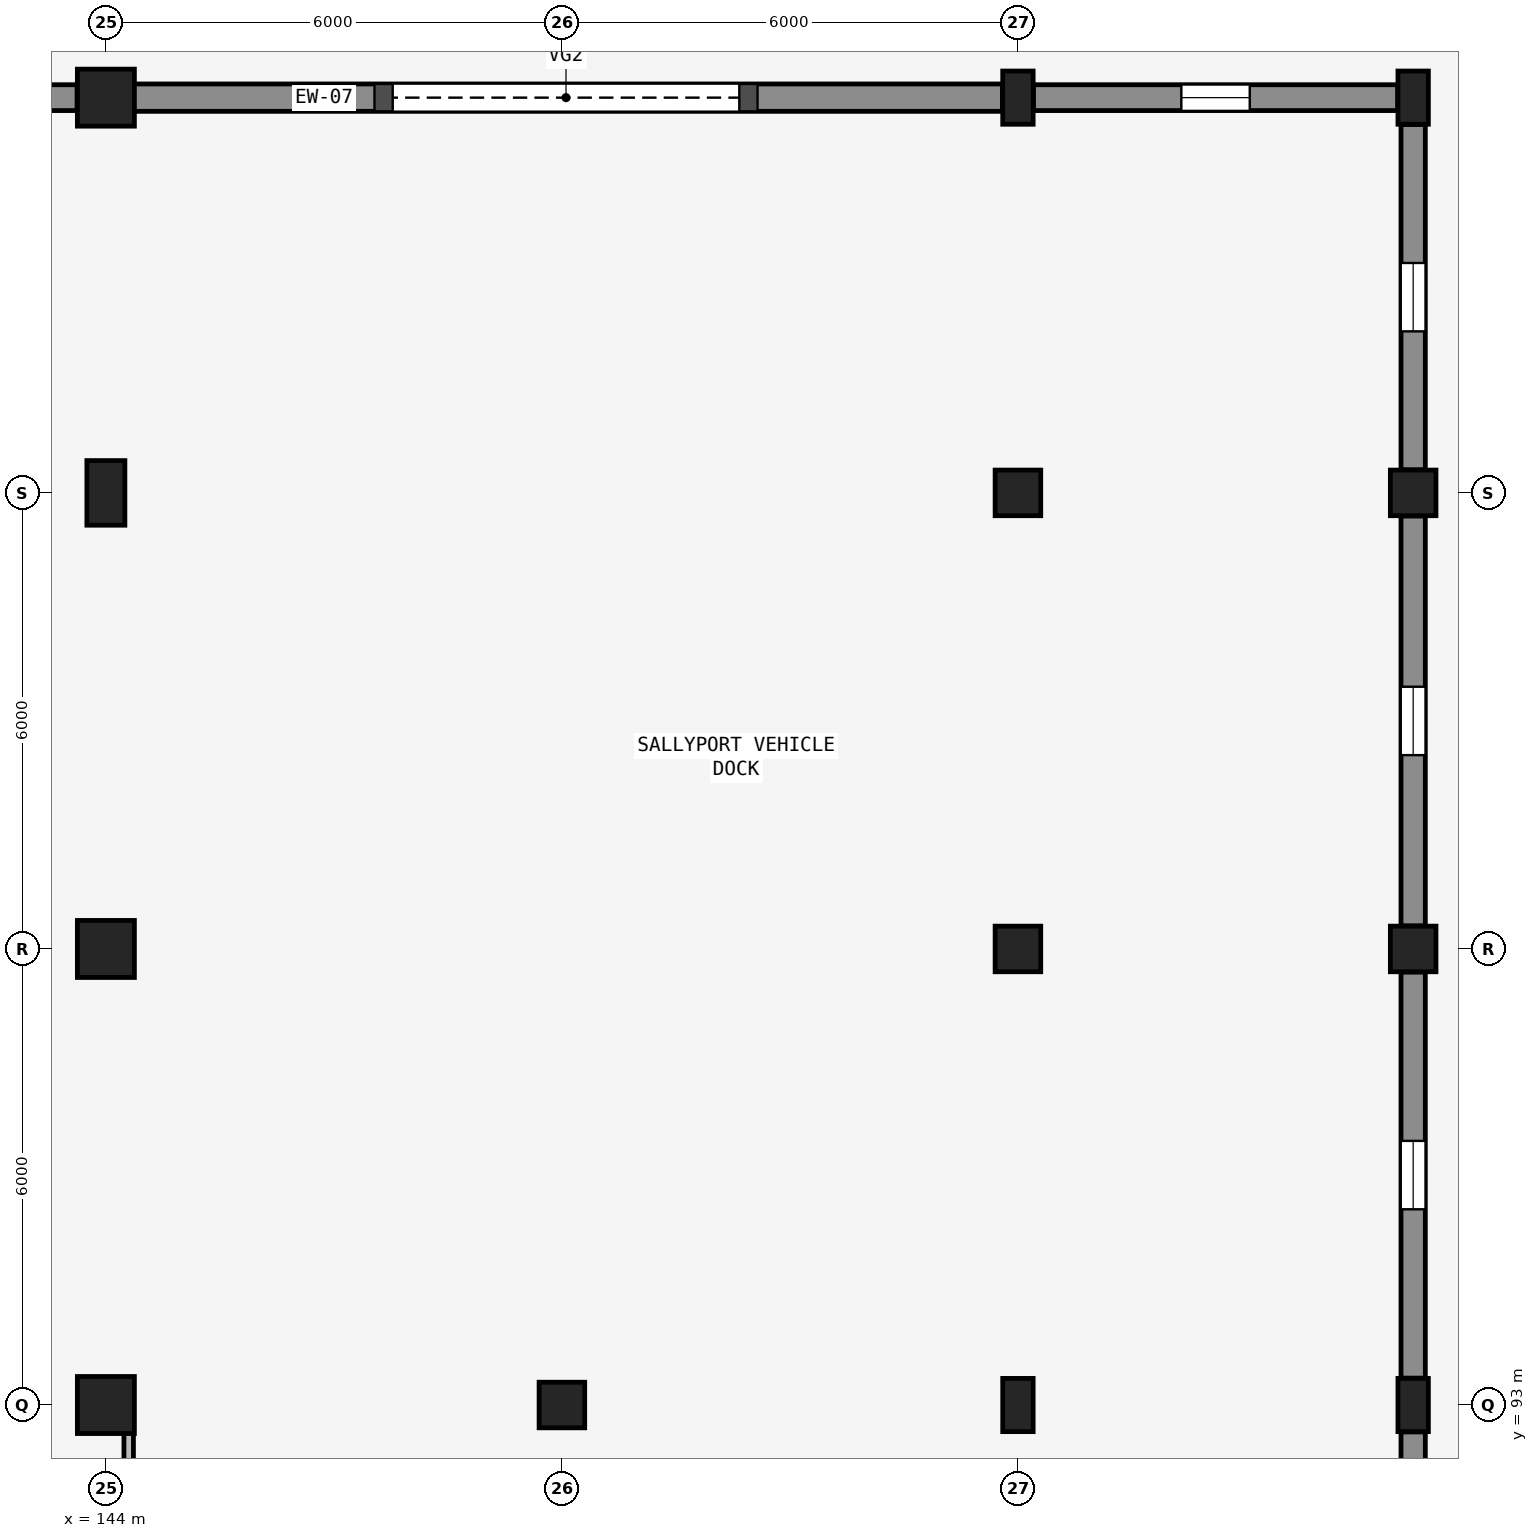
"""IFC4 building model, lengths in metres.
Left out: names, types, materials, properties, quantities, classifications, styles, units other than length and angle.
Written with IfcOpenShell. Run it as: python <this file> out.ifc"""

import sys

from ifc_helpers import new_model, si_unit, direction, frame, frame_2d, origin, origin_2d, place, context, subcontext, project, spatial, rectangle, extrude, element, fill, save


model = new_model("IFC4")
c1 = context("Model", 3, precision=1e-05, world=origin(), true_north=direction((0.0, 1.0)))
c2 = subcontext(c1, "Body", "Model", "MODEL_VIEW")
j1 = project(units=[si_unit("LENGTHUNIT", "METRE"), si_unit("PLANEANGLEUNIT", "RADIAN")], contexts=[c1])
p1 = place(None, origin())
s1 = spatial("IfcSite", under=j1, at=p1, CompositionType="ELEMENT")
p2 = place(p1, origin())
s2 = spatial("IfcBuilding", under=s1, at=p2, CompositionType="ELEMENT")
p3 = place(p2, origin())
s3 = spatial("IfcBuildingStorey", under=s2, at=p3, CompositionType="ELEMENT", Elevation=0.0)
for number, where, z_axis, x_axis in (
    (1, (144.0, 93.0, 0.0), (0.0, 0.0, 1.0), (1.0, 0.0, 0.0)),
    (2, (144.0, 99.0, 0.0), (0.0, 0.0, 1.0), (1.0, 0.0, 0.0)),
):
    element("IfcColumn", number, at=place(p3, frame(where, z_axis=z_axis, x_axis=x_axis)), inside=s3, PredefinedType="COLUMN", context=c2, shape_type="SweptSolid", body=[
        extrude(rectangle(XDim=0.75, YDim=0.75, at=origin_2d()), origin(), (0.0, 0.0, 1.0), 4.8),
    ])
p4 = place(p3, frame((144.0, 105.0, 0.0), z_axis=(0.0, 0.0, 1.0), x_axis=(1.0, 0.0, 0.0)))
e3 = element("IfcColumn", 3, at=p4, inside=s3, PredefinedType="COLUMN", context=c2, shape_type="SweptSolid", body=[
    extrude(rectangle(XDim=0.5, YDim=0.85, at=origin_2d()), origin(), (0.0, 0.0, 1.0), 4.8),
])
p5 = place(p3, frame((144.0, 110.2, 0.0), z_axis=(0.0, 0.0, 1.0), x_axis=(1.0, 0.0, 0.0)))
e4 = element("IfcColumn", 4, at=p5, inside=s3, PredefinedType="COLUMN", context=c2, shape_type="SweptSolid", body=[
    extrude(rectangle(XDim=0.75, YDim=0.75, at=origin_2d()), origin(), (0.0, 0.0, 1.0), 4.8),
])
p6 = place(p3, frame((150.0, 93.0, 0.0), z_axis=(0.0, 0.0, 1.0), x_axis=(1.0, 0.0, 0.0)))
e5 = element("IfcColumn", 5, at=p6, inside=s3, PredefinedType="COLUMN", context=c2, shape_type="SweptSolid", body=[
    extrude(rectangle(XDim=0.6, YDim=0.6, at=origin_2d()), origin(), (0.0, 0.0, 1.0), 4.8),
])
p7 = place(p3, frame((156.0, 93.0, 0.0), z_axis=(0.0, 0.0, 1.0), x_axis=(1.0, 0.0, 0.0)))
e6 = element("IfcColumn", 6, at=p7, inside=s3, PredefinedType="COLUMN", context=c2, shape_type="SweptSolid", body=[
    extrude(rectangle(XDim=0.4, YDim=0.7, at=origin_2d()), origin(), (0.0, 0.0, 1.0), 4.8),
])
for number, where, z_axis, x_axis in (
    (7, (156.0, 99.0, 0.0), (0.0, 0.0, 1.0), (1.0, 0.0, 0.0)),
    (8, (156.0, 105.0, 0.0), (0.0, 0.0, 1.0), (1.0, 0.0, 0.0)),
):
    element("IfcColumn", number, at=place(p3, frame(where, z_axis=z_axis, x_axis=x_axis)), inside=s3, PredefinedType="COLUMN", context=c2, shape_type="SweptSolid", body=[
        extrude(rectangle(XDim=0.6, YDim=0.6, at=origin_2d()), origin(), (0.0, 0.0, 1.0), 4.8),
    ])
for number, where, z_axis, x_axis in (
    (9, (156.0, 110.2, 0.0), (0.0, 0.0, 1.0), (1.0, 0.0, 0.0)),
    (10, (161.2, 93.0, 0.0), (0.0, 0.0, 1.0), (1.0, 0.0, 0.0)),
):
    element("IfcColumn", number, at=place(p3, frame(where, z_axis=z_axis, x_axis=x_axis)), inside=s3, PredefinedType="COLUMN", context=c2, shape_type="SweptSolid", body=[
        extrude(rectangle(XDim=0.4, YDim=0.7, at=origin_2d()), origin(), (0.0, 0.0, 1.0), 4.8),
    ])
for number, where, z_axis, x_axis in (
    (11, (161.2, 99.0, 0.0), (0.0, 0.0, 1.0), (1.0, 0.0, 0.0)),
    (12, (161.2, 105.0, 0.0), (0.0, 0.0, 1.0), (1.0, 0.0, 0.0)),
):
    element("IfcColumn", number, at=place(p3, frame(where, z_axis=z_axis, x_axis=x_axis)), inside=s3, PredefinedType="COLUMN", context=c2, shape_type="SweptSolid", body=[
        extrude(rectangle(XDim=0.6, YDim=0.6, at=origin_2d()), origin(), (0.0, 0.0, 1.0), 4.8),
    ])
p8 = place(p3, frame((161.2, 110.2, 0.0), z_axis=(0.0, 0.0, 1.0), x_axis=(1.0, 0.0, 0.0)))
e13 = element("IfcColumn", 13, at=p8, inside=s3, PredefinedType="COLUMN", context=c2, shape_type="SweptSolid", body=[
    extrude(rectangle(XDim=0.4, YDim=0.7, at=origin_2d()), origin(), (0.0, 0.0, 1.0), 4.8),
])
p9 = place(p3, frame((138.254, 110.2, 0.0), z_axis=(0.0, 0.0, 1.0), x_axis=(1.0, 0.0, 0.0)))
e14 = element("IfcWall", 14, at=p9, inside=s3, PredefinedType="SOLIDWALL", context=c2, shape_type="SweptSolid", body=[
    extrude(rectangle(XDim=5.367, YDim=0.34, at=frame_2d((2.684, 0.0))), origin(), (0.0, 0.0, 1.0), 4.083),
])
p10 = place(p9, frame((2.233, 0.0, 1.6)))
e15 = element("IfcOpeningElement", 15, at=p10, cuts=e14, PredefinedType="OPENING", context=c2, shape_type="SweptSolid", body=[
    extrude(rectangle(XDim=0.9, YDim=0.6, at=frame_2d((0.45, 0.3))), frame((0.0, 0.18, 0.0), z_axis=(0.0, -1.0, 0.0), x_axis=(1.0, 0.0, 0.0)), (0.0, 0.0, 1.0), 0.36),
])
p11 = place(p3, frame((144.354, 110.2, 0.0), z_axis=(0.0, 0.0, 1.0), x_axis=(1.0, 0.0, 0.0)))
e16 = element("IfcWall", 16, at=p11, inside=s3, PredefinedType="SOLIDWALL", context=c2, shape_type="SweptSolid", body=[
    extrude(rectangle(XDim=11.442, YDim=0.36, at=frame_2d((5.721, 0.0))), origin(), (0.0, 0.0, 1.0), 3.69),
])
p12 = place(p11, frame((3.3, 0.0, 0.0)))
e17 = element("IfcOpeningElement", 17, at=p12, cuts=e16, PredefinedType="OPENING", context=c2, shape_type="SweptSolid", body=[
    extrude(rectangle(XDim=4.8, YDim=3.1, at=frame_2d((2.4, 1.55))), frame((0.0, 0.19, 0.0), z_axis=(0.0, -1.0, 0.0), x_axis=(1.0, 0.0, 0.0)), (0.0, 0.0, 1.0), 0.38),
])
p13 = place(p3, frame((156.204, 110.2, 0.0), z_axis=(0.0, 0.0, 1.0), x_axis=(1.0, 0.0, 0.0)))
e18 = element("IfcWall", 18, at=p13, inside=s3, PredefinedType="SOLIDWALL", context=c2, shape_type="SweptSolid", body=[
    extrude(rectangle(XDim=4.792, YDim=0.34, at=frame_2d((2.396, 0.0))), origin(), (0.0, 0.0, 1.0), 3.69),
])
p14 = place(p13, frame((1.946, 0.0, 1.6)))
e19 = element("IfcOpeningElement", 19, at=p14, cuts=e18, PredefinedType="OPENING", context=c2, shape_type="SweptSolid", body=[
    extrude(rectangle(XDim=0.9, YDim=0.6, at=frame_2d((0.45, 0.3))), frame((0.0, 0.18, 0.0), z_axis=(0.0, -1.0, 0.0), x_axis=(1.0, 0.0, 0.0)), (0.0, 0.0, 1.0), 0.36),
])
p15 = place(p3, frame((161.2, 87.304, 0.0), z_axis=(0.0, 0.0, 1.0), x_axis=(0.0, 1.0, 0.0)))
e20 = element("IfcWall", 20, at=p15, inside=s3, PredefinedType="SOLIDWALL", context=c2, shape_type="SweptSolid", body=[
    extrude(rectangle(XDim=5.342, YDim=0.32, at=frame_2d((2.671, 0.0))), origin(), (0.0, 0.0, 1.0), 3.99),
])
p16 = place(p15, frame((2.221, 0.0, 1.6)))
e21 = element("IfcOpeningElement", 21, at=p16, cuts=e20, PredefinedType="OPENING", context=c2, shape_type="SweptSolid", body=[
    extrude(rectangle(XDim=0.9, YDim=0.6, at=frame_2d((0.45, 0.3))), frame((0.0, 0.17, 0.0), z_axis=(0.0, -1.0, 0.0), x_axis=(1.0, 0.0, 0.0)), (0.0, 0.0, 1.0), 0.34),
])
p17 = place(p3, frame((161.2, 93.354, 0.0), z_axis=(0.0, 0.0, 1.0), x_axis=(0.0, 1.0, 0.0)))
e22 = element("IfcWall", 22, at=p17, inside=s3, PredefinedType="SOLIDWALL", context=c2, shape_type="SweptSolid", body=[
    extrude(rectangle(XDim=5.342, YDim=0.32, at=frame_2d((2.671, 0.0))), origin(), (0.0, 0.0, 1.0), 4.04),
])
p18 = place(p17, frame((2.221, 0.0, 1.6)))
e23 = element("IfcOpeningElement", 23, at=p18, cuts=e22, PredefinedType="OPENING", context=c2, shape_type="SweptSolid", body=[
    extrude(rectangle(XDim=0.9, YDim=0.6, at=frame_2d((0.45, 0.3))), frame((0.0, 0.17, 0.0), z_axis=(0.0, -1.0, 0.0), x_axis=(1.0, 0.0, 0.0)), (0.0, 0.0, 1.0), 0.34),
])
p19 = place(p3, frame((161.2, 99.304, 0.0), z_axis=(0.0, 0.0, 1.0), x_axis=(0.0, 1.0, 0.0)))
e24 = element("IfcWall", 24, at=p19, inside=s3, PredefinedType="SOLIDWALL", context=c2, shape_type="SweptSolid", body=[
    extrude(rectangle(XDim=5.392, YDim=0.32, at=frame_2d((2.696, 0.0))), origin(), (0.0, 0.0, 1.0), 4.083),
])
p20 = place(p19, frame((2.246, 0.0, 1.6)))
e25 = element("IfcOpeningElement", 25, at=p20, cuts=e24, PredefinedType="OPENING", context=c2, shape_type="SweptSolid", body=[
    extrude(rectangle(XDim=0.9, YDim=0.6, at=frame_2d((0.45, 0.3))), frame((0.0, 0.17, 0.0), z_axis=(0.0, -1.0, 0.0), x_axis=(1.0, 0.0, 0.0)), (0.0, 0.0, 1.0), 0.34),
])
p21 = place(p3, frame((161.2, 105.304, 0.0), z_axis=(0.0, 0.0, 1.0), x_axis=(0.0, 1.0, 0.0)))
e26 = element("IfcWall", 26, at=p21, inside=s3, PredefinedType="SOLIDWALL", context=c2, shape_type="SweptSolid", body=[
    extrude(rectangle(XDim=4.542, YDim=0.32, at=frame_2d((2.271, 0.0))), origin(), (0.0, 0.0, 1.0), 4.083),
])
p22 = place(p21, frame((1.821, 0.0, 1.6)))
e27 = element("IfcOpeningElement", 27, at=p22, cuts=e26, PredefinedType="OPENING", context=c2, shape_type="SweptSolid", body=[
    extrude(rectangle(XDim=0.9, YDim=0.6, at=frame_2d((0.45, 0.3))), frame((0.0, 0.17, 0.0), z_axis=(0.0, -1.0, 0.0), x_axis=(1.0, 0.0, 0.0)), (0.0, 0.0, 1.0), 0.34),
])
p23 = place(p3, frame((144.3, 69.5, 0.0), z_axis=(0.0, 0.0, 1.0), x_axis=(0.0, 1.0, 0.0)))
e28 = element("IfcWall", 28, at=p23, inside=s3, PredefinedType="PARTITIONING", context=c2, shape_type="SweptSolid", body=[
    extrude(rectangle(XDim=23.3, YDim=0.125, at=frame_2d((11.65, 0.0))), origin(), (0.0, 0.0, 1.0), 3.99),
])
p24 = place(p23, frame((12.475, 0.0, 0.0)))
e29 = element("IfcOpeningElement", 29, at=p24, cuts=e28, PredefinedType="OPENING", context=c2, shape_type="SweptSolid", body=[
    extrude(rectangle(XDim=1.05, YDim=2.2, at=frame_2d((0.525, 1.1))), frame((0.0, 0.073, 0.0), z_axis=(0.0, -1.0, 0.0), x_axis=(1.0, 0.0, 0.0)), (0.0, 0.0, 1.0), 0.145),
])
p25 = place(p12, origin())
e30 = element("IfcDoor", 30, at=p25, inside=s3, OperationType="ROLLINGUP", PredefinedType="GATE", context=c2, shape_type="SweptSolid", body=[
    extrude(rectangle(XDim=4.8, YDim=3.1, at=frame_2d((2.4, 1.55))), frame((0.0, 0.025, 0.0), z_axis=(0.0, -1.0, 0.0), x_axis=(1.0, 0.0, 0.0)), (0.0, 0.0, 1.0), 0.05),
])
fill(e17, e30)
p26 = place(p14, origin())
e31 = element("IfcWindow", 31, at=p26, inside=s3, PartitioningType="SINGLE_PANEL", PredefinedType="WINDOW", context=c2, shape_type="SweptSolid", body=[
    extrude(rectangle(XDim=0.9, YDim=0.6, at=frame_2d((0.45, 0.3))), frame((0.0, 0.03, 0.0), z_axis=(0.0, -1.0, 0.0), x_axis=(1.0, 0.0, 0.0)), (0.0, 0.0, 1.0), 0.06),
])
fill(e19, e31)
p27 = place(p18, origin())
e32 = element("IfcWindow", 32, at=p27, inside=s3, PartitioningType="SINGLE_PANEL", PredefinedType="WINDOW", context=c2, shape_type="SweptSolid", body=[
    extrude(rectangle(XDim=0.9, YDim=0.6, at=frame_2d((0.45, 0.3))), frame((0.0, 0.03, 0.0), z_axis=(0.0, -1.0, 0.0), x_axis=(1.0, 0.0, 0.0)), (0.0, 0.0, 1.0), 0.06),
])
fill(e23, e32)
p28 = place(p20, origin())
e33 = element("IfcWindow", 33, at=p28, inside=s3, PartitioningType="SINGLE_PANEL", PredefinedType="WINDOW", context=c2, shape_type="SweptSolid", body=[
    extrude(rectangle(XDim=0.9, YDim=0.6, at=frame_2d((0.45, 0.3))), frame((0.0, 0.03, 0.0), z_axis=(0.0, -1.0, 0.0), x_axis=(1.0, 0.0, 0.0)), (0.0, 0.0, 1.0), 0.06),
])
fill(e25, e33)
p29 = place(p22, origin())
e34 = element("IfcWindow", 34, at=p29, inside=s3, PartitioningType="SINGLE_PANEL", PredefinedType="WINDOW", context=c2, shape_type="SweptSolid", body=[
    extrude(rectangle(XDim=0.9, YDim=0.6, at=frame_2d((0.45, 0.3))), frame((0.0, 0.03, 0.0), z_axis=(0.0, -1.0, 0.0), x_axis=(1.0, 0.0, 0.0)), (0.0, 0.0, 1.0), 0.06),
])
fill(e27, e34)
save(model, sys.argv[1])
